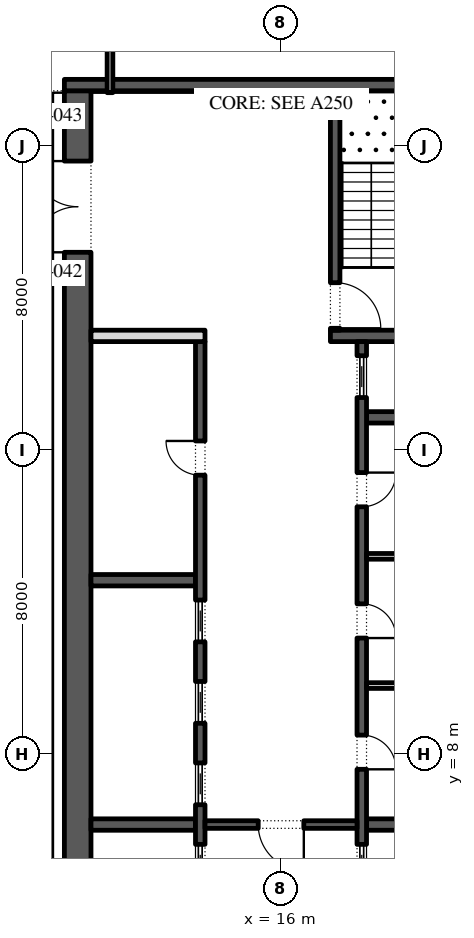
"""IFC4 building model, lengths in metres.
Left out: names, types, materials, properties, quantities, classifications, styles, units other than length and angle.
Written with IfcOpenShell. Run it as: python <this file> out.ifc"""

import sys

from ifc_helpers import new_model, si_unit, direction, frame, frame_2d, origin, place, context, subcontext, project, spatial, rectangle, extrude, element, fill, save


model = new_model("IFC4")
c1 = context("Model", 3, precision=1e-05, world=origin(), true_north=direction((0.0, 1.0)))
c2 = subcontext(c1, "Body", "Model", "MODEL_VIEW")
j1 = project(units=[si_unit("LENGTHUNIT", "METRE"), si_unit("PLANEANGLEUNIT", "RADIAN")], contexts=[c1])
p1 = place(None, origin())
s1 = spatial("IfcSite", under=j1, at=p1, CompositionType="ELEMENT")
p2 = place(p1, origin())
s2 = spatial("IfcBuilding", under=s1, at=p2, CompositionType="ELEMENT")
p3 = place(p2, frame((0.0, 0.0, 213.6)))
s3 = spatial("IfcBuildingStorey", under=s2, at=p3, CompositionType="ELEMENT", Elevation=213.6)
p4 = place(p3, frame((10.65, -2.45, 0.0), z_axis=(0.0, 0.0, 1.0), x_axis=(0.0, 1.0, 0.0)))
e1 = element("IfcWall", 1, at=p4, inside=s3, PredefinedType="SHEAR", context=c2, shape_type="SweptSolid", body=[
    extrude(rectangle(XDim=27.9, YDim=0.7, at=frame_2d((13.95, 0.0))), origin(), (0.0, 0.0, 1.0), 4.0),
])
p5 = place(p4, frame((23.65, 0.0, 0.0)))
e2 = element("IfcOpeningElement", 2, at=p5, cuts=e1, PredefinedType="OPENING", context=c2, shape_type="SweptSolid", body=[
    extrude(rectangle(XDim=2.4, YDim=2.1, at=frame_2d((1.2, 1.05))), frame((0.0, 0.36, 0.0), z_axis=(0.0, -1.0, 0.0), x_axis=(1.0, 0.0, 0.0)), (0.0, 0.0, 1.0), 0.72),
])
p6 = place(p4, frame((1.387, 0.0, 0.0)))
e3 = element("IfcOpeningElement", 3, at=p6, cuts=e1, PredefinedType="OPENING", context=c2, shape_type="SweptSolid", body=[
    extrude(rectangle(XDim=0.9, YDim=2.1, at=frame_2d((0.45, 1.05))), frame((0.0, 0.36, 0.0), z_axis=(0.0, -1.0, 0.0), x_axis=(1.0, 0.0, 0.0)), (0.0, 0.0, 1.0), 0.72),
])
p7 = place(p4, frame((4.562, 0.0, 0.0)))
e4 = element("IfcOpeningElement", 4, at=p7, cuts=e1, PredefinedType="OPENING", context=c2, shape_type="SweptSolid", body=[
    extrude(rectangle(XDim=1.0, YDim=2.1, at=frame_2d((0.5, 1.05))), frame((0.0, 0.36, 0.0), z_axis=(0.0, -1.0, 0.0), x_axis=(1.0, 0.0, 0.0)), (0.0, 0.0, 1.0), 0.72),
])
p8 = place(p3, frame((10.3, 25.6, 0.0), z_axis=(0.0, 0.0, 1.0), x_axis=(1.0, 0.0, 0.0)))
e5 = element("IfcWall", 5, at=p8, inside=s3, PredefinedType="SHEAR", context=c2, shape_type="SweptSolid", body=[
    extrude(rectangle(XDim=11.4, YDim=0.3, at=frame_2d((5.7, 0.0))), origin(), (0.0, 0.0, 1.0), 4.0),
])
p9 = place(p3, frame((17.3, 19.0, 0.0), z_axis=(0.0, 0.0, 1.0), x_axis=(1.0, 0.0, 0.0)))
e6 = element("IfcWall", 6, at=p9, inside=s3, PredefinedType="SHEAR", context=c2, shape_type="SweptSolid", body=[
    extrude(rectangle(XDim=3.7, YDim=0.3, at=frame_2d((1.85, 0.0))), origin(), (0.0, 0.0, 1.0), 4.0),
])
p10 = place(p3, frame((17.425, 19.15, 0.0), z_axis=(0.0, 0.0, 1.0), x_axis=(0.0, 1.0, 0.0)))
e7 = element("IfcWall", 7, at=p10, inside=s3, PredefinedType="SHEAR", context=c2, shape_type="SweptSolid", body=[
    extrude(rectangle(XDim=6.3, YDim=0.25, at=frame_2d((3.15, 0.0))), origin(), (0.0, 0.0, 1.0), 4.0),
])
p11 = place(p10, frame((0.05, 0.0, 0.0)))
e8 = element("IfcOpeningElement", 8, at=p11, cuts=e7, PredefinedType="OPENING", context=c2, shape_type="SweptSolid", body=[
    extrude(rectangle(XDim=1.2, YDim=2.1, at=frame_2d((0.6, 1.05))), frame((0.0, 0.135, 0.0), z_axis=(0.0, -1.0, 0.0), x_axis=(1.0, 0.0, 0.0)), (0.0, 0.0, 1.0), 0.27),
])
for number, where, z_axis, x_axis in (
    (9, (18.25, 6.143, 0.0), (0.0, 0.0, 1.0), (1.0, 0.0, 0.0)),
    (10, (18.25, 16.857, 0.0), (0.0, 0.0, 1.0), (1.0, 0.0, 0.0)),
):
    element("IfcWall", number, at=place(p3, frame(where, z_axis=z_axis, x_axis=x_axis)), inside=s3, PredefinedType="SHEAR", context=c2, shape_type="SweptSolid", body=[
        extrude(rectangle(XDim=2.75, YDim=0.3, at=frame_2d((1.375, 0.0))), origin(), (0.0, 0.0, 1.0), 4.0),
    ])
p12 = place(p3, frame((18.125, 4.15, 0.0), z_axis=(0.0, 0.0, 1.0), x_axis=(0.0, 1.0, 0.0)))
e11 = element("IfcWall", 11, at=p12, inside=s3, PredefinedType="SHEAR", context=c2, shape_type="SweptSolid", body=[
    extrude(rectangle(XDim=14.7, YDim=0.25, at=frame_2d((7.35, 0.0))), origin(), (0.0, 0.0, 1.0), 4.0),
])
p13 = place(p12, frame((3.446, 0.0, 0.0)))
e12 = element("IfcOpeningElement", 12, at=p13, cuts=e11, PredefinedType="OPENING", context=c2, shape_type="SweptSolid", body=[
    extrude(rectangle(XDim=0.9, YDim=2.1, at=frame_2d((0.45, 1.05))), frame((0.0, 0.135, 0.0), z_axis=(0.0, -1.0, 0.0), x_axis=(1.0, 0.0, 0.0)), (0.0, 0.0, 1.0), 0.27),
])
p14 = place(p12, frame((6.9, 0.0, 0.0)))
e13 = element("IfcOpeningElement", 13, at=p14, cuts=e11, PredefinedType="OPENING", context=c2, shape_type="SweptSolid", body=[
    extrude(rectangle(XDim=0.9, YDim=2.1, at=frame_2d((0.45, 1.05))), frame((0.0, 0.135, 0.0), z_axis=(0.0, -1.0, 0.0), x_axis=(1.0, 0.0, 0.0)), (0.0, 0.0, 1.0), 0.27),
])
p15 = place(p12, frame((10.354, 0.0, 0.0)))
e14 = element("IfcOpeningElement", 14, at=p15, cuts=e11, PredefinedType="OPENING", context=c2, shape_type="SweptSolid", body=[
    extrude(rectangle(XDim=0.9, YDim=2.1, at=frame_2d((0.45, 1.05))), frame((0.0, 0.135, 0.0), z_axis=(0.0, -1.0, 0.0), x_axis=(1.0, 0.0, 0.0)), (0.0, 0.0, 1.0), 0.27),
])
p16 = place(p12, frame((0.371, 0.0, 0.0)))
e15 = element("IfcOpeningElement", 15, at=p16, cuts=e11, PredefinedType="OPENING", context=c2, shape_type="SweptSolid", body=[
    extrude(rectangle(XDim=1.1, YDim=2.1, at=frame_2d((0.55, 1.05))), frame((0.0, 0.135, 0.0), z_axis=(0.0, -1.0, 0.0), x_axis=(1.0, 0.0, 0.0)), (0.0, 0.0, 1.0), 0.27),
])
p17 = place(p12, frame((13.229, 0.0, 0.0)))
e16 = element("IfcOpeningElement", 16, at=p17, cuts=e11, PredefinedType="OPENING", context=c2, shape_type="SweptSolid", body=[
    extrude(rectangle(XDim=1.1, YDim=2.1, at=frame_2d((0.55, 1.05))), frame((0.0, 0.135, 0.0), z_axis=(0.0, -1.0, 0.0), x_axis=(1.0, 0.0, 0.0)), (0.0, 0.0, 1.0), 0.27),
])
for number, where, z_axis, x_axis in (
    (17, (18.25, 9.8, 0.0), (0.0, 0.0, 1.0), (1.0, 0.0, 0.0)),
    (18, (18.25, 13.2, 0.0), (0.0, 0.0, 1.0), (1.0, 0.0, 0.0)),
):
    element("IfcWall", number, at=place(p3, frame(where, z_axis=z_axis, x_axis=x_axis)), inside=s3, PredefinedType="PARTITIONING", context=c2, shape_type="SweptSolid", body=[
        extrude(rectangle(XDim=2.75, YDim=0.15, at=frame_2d((1.375, 0.0))), origin(), (0.0, 0.0, 1.0), 4.0),
    ])
for number, where, z_axis, x_axis in (
    (19, (11.0, 6.143, 0.0), (0.0, 0.0, 1.0), (1.0, 0.0, 0.0)),
    (20, (11.0, 12.571, 0.0), (0.0, 0.0, 1.0), (1.0, 0.0, 0.0)),
):
    element("IfcWall", number, at=place(p3, frame(where, z_axis=z_axis, x_axis=x_axis)), inside=s3, PredefinedType="SHEAR", context=c2, shape_type="SweptSolid", body=[
        extrude(rectangle(XDim=2.75, YDim=0.3, at=frame_2d((1.375, 0.0))), origin(), (0.0, 0.0, 1.0), 4.0),
    ])
p18 = place(p3, frame((13.875, -2.45, 0.0), z_axis=(0.0, 0.0, 1.0), x_axis=(0.0, 1.0, 0.0)))
e21 = element("IfcWall", 21, at=p18, inside=s3, PredefinedType="SHEAR", context=c2, shape_type="SweptSolid", body=[
    extrude(rectangle(XDim=21.3, YDim=0.25, at=frame_2d((10.65, 0.0))), origin(), (0.0, 0.0, 1.0), 4.0),
])
p19 = place(p18, frame((17.786, 0.0, 0.0)))
e22 = element("IfcOpeningElement", 22, at=p19, cuts=e21, PredefinedType="OPENING", context=c2, shape_type="SweptSolid", body=[
    extrude(rectangle(XDim=0.9, YDim=2.1, at=frame_2d((0.45, 1.05))), frame((0.0, 0.135, 0.0), z_axis=(0.0, -1.0, 0.0), x_axis=(1.0, 0.0, 0.0)), (0.0, 0.0, 1.0), 0.27),
])
p20 = place(p18, frame((6.971, 0.0, 0.0)))
e23 = element("IfcOpeningElement", 23, at=p20, cuts=e21, PredefinedType="OPENING", context=c2, shape_type="SweptSolid", body=[
    extrude(rectangle(XDim=1.1, YDim=2.1, at=frame_2d((0.55, 1.05))), frame((0.0, 0.135, 0.0), z_axis=(0.0, -1.0, 0.0), x_axis=(1.0, 0.0, 0.0)), (0.0, 0.0, 1.0), 0.27),
])
p21 = place(p18, frame((9.114, 0.0, 0.0)))
e24 = element("IfcOpeningElement", 24, at=p21, cuts=e21, PredefinedType="OPENING", context=c2, shape_type="SweptSolid", body=[
    extrude(rectangle(XDim=1.1, YDim=2.1, at=frame_2d((0.55, 1.05))), frame((0.0, 0.135, 0.0), z_axis=(0.0, -1.0, 0.0), x_axis=(1.0, 0.0, 0.0)), (0.0, 0.0, 1.0), 0.27),
])
p22 = place(p18, frame((11.257, 0.0, 0.0)))
e25 = element("IfcOpeningElement", 25, at=p22, cuts=e21, PredefinedType="OPENING", context=c2, shape_type="SweptSolid", body=[
    extrude(rectangle(XDim=1.1, YDim=2.1, at=frame_2d((0.55, 1.05))), frame((0.0, 0.135, 0.0), z_axis=(0.0, -1.0, 0.0), x_axis=(1.0, 0.0, 0.0)), (0.0, 0.0, 1.0), 0.27),
])
p23 = place(p18, frame((13.4, 0.0, 0.0)))
e26 = element("IfcOpeningElement", 26, at=p23, cuts=e21, PredefinedType="OPENING", context=c2, shape_type="SweptSolid", body=[
    extrude(rectangle(XDim=1.1, YDim=2.1, at=frame_2d((0.55, 1.05))), frame((0.0, 0.135, 0.0), z_axis=(0.0, -1.0, 0.0), x_axis=(1.0, 0.0, 0.0)), (0.0, 0.0, 1.0), 0.27),
])
p24 = place(p3, frame((11.0, 19.0, 0.0), z_axis=(0.0, 0.0, 1.0), x_axis=(1.0, 0.0, 0.0)))
e27 = element("IfcWall", 27, at=p24, inside=s3, PredefinedType="PARTITIONING", context=c2, shape_type="SweptSolid", body=[
    extrude(rectangle(XDim=3.0, YDim=0.3, at=frame_2d((1.5, 0.0))), origin(), (0.0, 0.0, 1.0), 4.0),
])
p25 = place(p3, frame((14.0, 6.143, 0.0), z_axis=(0.0, 0.0, 1.0), x_axis=(1.0, 0.0, 0.0)))
e28 = element("IfcWall", 28, at=p25, inside=s3, PredefinedType="SHEAR", context=c2, shape_type="SweptSolid", body=[
    extrude(rectangle(XDim=4.0, YDim=0.2, at=frame_2d((2.0, 0.0))), origin(), (0.0, 0.0, 1.0), 4.0),
])
p26 = place(p25, frame((1.4, 0.0, 0.0)))
e29 = element("IfcOpeningElement", 29, at=p26, cuts=e28, PredefinedType="OPENING", context=c2, shape_type="SweptSolid", body=[
    extrude(rectangle(XDim=1.2, YDim=2.1, at=frame_2d((0.6, 1.05))), frame((0.0, 0.11, 0.0), z_axis=(0.0, -1.0, 0.0), x_axis=(1.0, 0.0, 0.0)), (0.0, 0.0, 1.0), 0.22),
])
p27 = place(p3, frame((11.5, 29.165, 0.0), z_axis=(0.0, 0.0, 1.0), x_axis=(0.0, -1.0, 0.0)))
e30 = element("IfcWall", 30, at=p27, inside=s3, PredefinedType="PARTITIONING", context=c2, shape_type="SweptSolid", body=[
    extrude(rectangle(XDim=3.765, YDim=0.15, at=frame_2d((1.883, 0.0))), origin(), (0.0, 0.0, 1.0), 4.0),
])
p28 = place(p27, frame((0.615, 0.0, 0.0)))
e31 = element("IfcOpeningElement", 31, at=p28, cuts=e30, PredefinedType="OPENING", context=c2, shape_type="SweptSolid", body=[
    extrude(rectangle(XDim=1.0, YDim=2.1, at=frame_2d((0.5, 1.05))), frame((0.0, 0.085, 0.0), z_axis=(0.0, -1.0, 0.0), x_axis=(1.0, 0.0, 0.0)), (0.0, 0.0, 1.0), 0.17),
])
p29 = place(p13, frame((0.9, -0.2, 0.0), z_axis=(0.0, 0.0, 1.0), x_axis=(-1.0, 0.0, 0.0)))
e32 = element("IfcDoor", 32, at=p29, inside=s3, OperationType="SINGLE_SWING_LEFT", PredefinedType="DOOR", context=c2, shape_type="SweptSolid", body=[
    extrude(rectangle(XDim=0.9, YDim=2.1, at=frame_2d((0.45, 1.05))), frame((0.0, -0.075, 0.0), z_axis=(0.0, -1.0, 0.0), x_axis=(1.0, 0.0, 0.0)), (0.0, 0.0, 1.0), 0.05),
])
fill(e12, e32)
p30 = place(p14, frame((0.9, -0.2, 0.0), z_axis=(0.0, 0.0, 1.0), x_axis=(-1.0, 0.0, 0.0)))
e33 = element("IfcDoor", 33, at=p30, inside=s3, OperationType="SINGLE_SWING_LEFT", PredefinedType="DOOR", context=c2, shape_type="SweptSolid", body=[
    extrude(rectangle(XDim=0.9, YDim=2.1, at=frame_2d((0.45, 1.05))), frame((0.0, -0.075, 0.0), z_axis=(0.0, -1.0, 0.0), x_axis=(1.0, 0.0, 0.0)), (0.0, 0.0, 1.0), 0.05),
])
fill(e13, e33)
p31 = place(p15, frame((0.9, -0.2, 0.0), z_axis=(0.0, 0.0, 1.0), x_axis=(-1.0, 0.0, 0.0)))
e34 = element("IfcDoor", 34, at=p31, inside=s3, OperationType="SINGLE_SWING_RIGHT", PredefinedType="DOOR", context=c2, shape_type="SweptSolid", body=[
    extrude(rectangle(XDim=0.9, YDim=2.1, at=frame_2d((0.45, 1.05))), frame((0.0, -0.075, 0.0), z_axis=(0.0, -1.0, 0.0), x_axis=(1.0, 0.0, 0.0)), (0.0, 0.0, 1.0), 0.05),
])
fill(e14, e34)
p32 = place(p16, origin())
e35 = element("IfcDoor", 35, at=p32, inside=s3, OperationType="SLIDING_TO_LEFT", PredefinedType="DOOR", context=c2, shape_type="SweptSolid", body=[
    extrude(rectangle(XDim=1.1, YDim=2.1, at=frame_2d((0.55, 1.05))), frame((0.0, 0.025, 0.0), z_axis=(0.0, -1.0, 0.0), x_axis=(1.0, 0.0, 0.0)), (0.0, 0.0, 1.0), 0.05),
])
fill(e15, e35)
p33 = place(p17, origin())
e36 = element("IfcDoor", 36, at=p33, inside=s3, OperationType="SLIDING_TO_LEFT", PredefinedType="DOOR", context=c2, shape_type="SweptSolid", body=[
    extrude(rectangle(XDim=1.1, YDim=2.1, at=frame_2d((0.55, 1.05))), frame((0.0, 0.025, 0.0), z_axis=(0.0, -1.0, 0.0), x_axis=(1.0, 0.0, 0.0)), (0.0, 0.0, 1.0), 0.05),
])
fill(e16, e36)
p34 = place(p19, origin())
e37 = element("IfcDoor", 37, at=p34, inside=s3, OperationType="SINGLE_SWING_LEFT", PredefinedType="DOOR", context=c2, shape_type="SweptSolid", body=[
    extrude(rectangle(XDim=0.9, YDim=2.1, at=frame_2d((0.45, 1.05))), frame((0.0, 0.125, 0.0), z_axis=(0.0, -1.0, 0.0), x_axis=(1.0, 0.0, 0.0)), (0.0, 0.0, 1.0), 0.05),
])
fill(e22, e37)
p35 = place(p20, origin())
e38 = element("IfcDoor", 38, at=p35, inside=s3, OperationType="SLIDING_TO_LEFT", PredefinedType="DOOR", context=c2, shape_type="SweptSolid", body=[
    extrude(rectangle(XDim=1.1, YDim=2.1, at=frame_2d((0.55, 1.05))), frame((0.0, 0.025, 0.0), z_axis=(0.0, -1.0, 0.0), x_axis=(1.0, 0.0, 0.0)), (0.0, 0.0, 1.0), 0.05),
])
fill(e23, e38)
p36 = place(p21, origin())
e39 = element("IfcDoor", 39, at=p36, inside=s3, OperationType="SLIDING_TO_LEFT", PredefinedType="DOOR", context=c2, shape_type="SweptSolid", body=[
    extrude(rectangle(XDim=1.1, YDim=2.1, at=frame_2d((0.55, 1.05))), frame((0.0, 0.025, 0.0), z_axis=(0.0, -1.0, 0.0), x_axis=(1.0, 0.0, 0.0)), (0.0, 0.0, 1.0), 0.05),
])
fill(e24, e39)
p37 = place(p22, origin())
e40 = element("IfcDoor", 40, at=p37, inside=s3, OperationType="SLIDING_TO_LEFT", PredefinedType="DOOR", context=c2, shape_type="SweptSolid", body=[
    extrude(rectangle(XDim=1.1, YDim=2.1, at=frame_2d((0.55, 1.05))), frame((0.0, 0.025, 0.0), z_axis=(0.0, -1.0, 0.0), x_axis=(1.0, 0.0, 0.0)), (0.0, 0.0, 1.0), 0.05),
])
fill(e25, e40)
p38 = place(p23, origin())
e41 = element("IfcDoor", 41, at=p38, inside=s3, OperationType="SLIDING_TO_LEFT", PredefinedType="DOOR", context=c2, shape_type="SweptSolid", body=[
    extrude(rectangle(XDim=1.1, YDim=2.1, at=frame_2d((0.55, 1.05))), frame((0.0, 0.025, 0.0), z_axis=(0.0, -1.0, 0.0), x_axis=(1.0, 0.0, 0.0)), (0.0, 0.0, 1.0), 0.05),
])
fill(e26, e41)
p39 = place(p26, frame((1.2, 0.0, 0.0), z_axis=(0.0, 0.0, 1.0), x_axis=(-1.0, 0.0, 0.0)))
e42 = element("IfcDoor", 42, at=p39, inside=s3, OperationType="SINGLE_SWING_RIGHT", PredefinedType="DOOR", context=c2, shape_type="SweptSolid", body=[
    extrude(rectangle(XDim=1.2, YDim=2.1, at=frame_2d((0.6, 1.05))), frame((0.0, 0.025, 0.0), z_axis=(0.0, -1.0, 0.0), x_axis=(1.0, 0.0, 0.0)), (0.0, 0.0, 1.0), 0.05),
])
fill(e29, e42)
p40 = place(p5, origin())
e43 = element("IfcDoor", 43, at=p40, inside=s3, OperationType="DOUBLE_DOOR_SINGLE_SWING", PredefinedType="DOOR", context=c2, shape_type="SweptSolid", body=[
    extrude(rectangle(XDim=2.4, YDim=2.1, at=frame_2d((1.2, 1.05))), frame((0.0, 0.025, 0.0), z_axis=(0.0, -1.0, 0.0), x_axis=(1.0, 0.0, 0.0)), (0.0, 0.0, 1.0), 0.05),
])
fill(e2, e43)
p41 = place(p11, frame((1.2, 0.0, 0.0), z_axis=(0.0, 0.0, 1.0), x_axis=(-1.0, 0.0, 0.0)))
e44 = element("IfcDoor", 44, at=p41, inside=s3, OperationType="SINGLE_SWING_LEFT", PredefinedType="DOOR", context=c2, shape_type="SweptSolid", body=[
    extrude(rectangle(XDim=1.2, YDim=2.1, at=frame_2d((0.6, 1.05))), frame((0.0, 0.025, 0.0), z_axis=(0.0, -1.0, 0.0), x_axis=(1.0, 0.0, 0.0)), (0.0, 0.0, 1.0), 0.05),
])
fill(e8, e44)
save(model, sys.argv[1])
